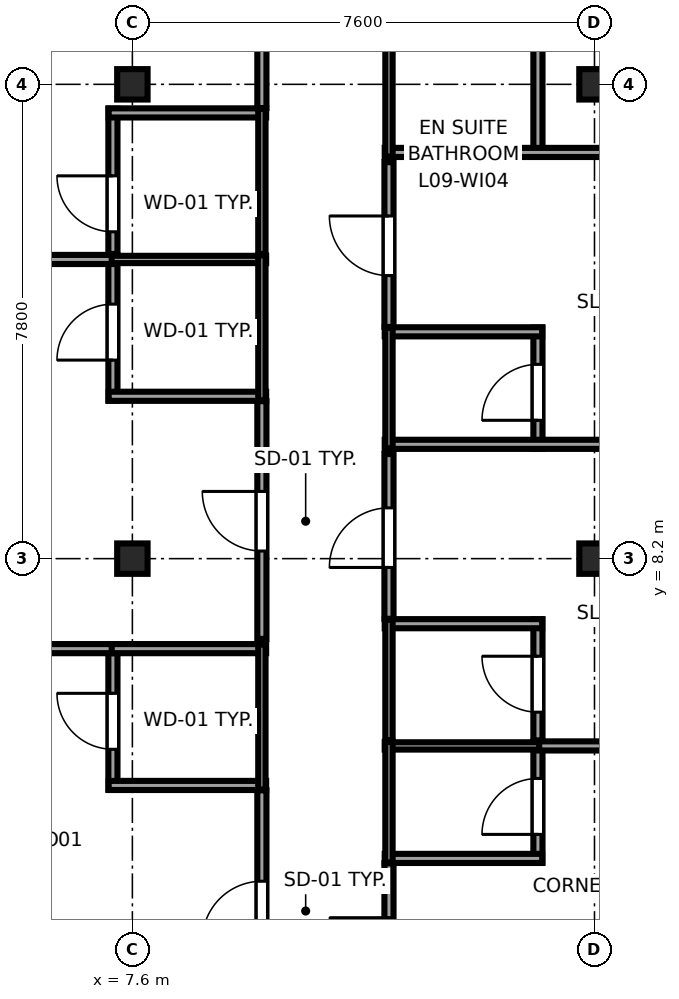
"""IFC4 building model, lengths in metres.
Left out: names, types, materials, properties, quantities, classifications, styles, units other than length and angle.
Written with IfcOpenShell. Run it as: python <this file> out.ifc"""

import sys

from ifc_helpers import new_model, si_unit, direction, frame, frame_2d, origin, origin_2d, place, context, subcontext, project, spatial, rectangle, i_section, extrude, source, transform, mapped, element, fill, save


model = new_model("IFC4")
c1 = context("Model", 3, precision=1e-05, world=origin(), true_north=direction((0.0, 1.0)))
c2 = subcontext(c1, "Body", "Model", "MODEL_VIEW")
j1 = project(units=[si_unit("LENGTHUNIT", "METRE"), si_unit("PLANEANGLEUNIT", "RADIAN")], contexts=[c1])
p1 = place(None, origin())
s1 = spatial("IfcSite", under=j1, at=p1, CompositionType="ELEMENT")
p2 = place(p1, origin())
s2 = spatial("IfcBuilding", under=s1, at=p2, CompositionType="ELEMENT")
p3 = place(p2, frame((0.0, 0.0, 42.65)))
s3 = spatial("IfcBuildingStorey", under=s2, at=p3, CompositionType="ELEMENT", Elevation=42.65)
m1 = source(origin(), c2, "Body", "SweptSolid", [
    extrude(i_section(OverallWidth=0.5, OverallDepth=0.5, WebThickness=0.028, FlangeThickness=0.045, at=origin_2d()), origin(), (0.0, 0.0, 1.0), 3.55),
])
for number, where, z_axis, x_axis in (
    (1, (7.6, 8.2, 0.0), (0.0, 0.0, 1.0), (1.0, 0.0, 0.0)),
    (2, (7.6, 16.0, 0.0), (0.0, 0.0, 1.0), (1.0, 0.0, 0.0)),
    (3, (15.2, 8.2, 0.0), (0.0, 0.0, 1.0), (1.0, 0.0, 0.0)),
    (4, (15.2, 16.0, 0.0), (0.0, 0.0, 1.0), (1.0, 0.0, 0.0)),
):
    element("IfcColumn", number, at=place(p3, frame(where, z_axis=z_axis, x_axis=x_axis)), inside=s3, PredefinedType="COLUMN", context=c2, shape_type="MappedRepresentation", body=[
        mapped(m1, transform((0.0, 0.0, 0.0), x_axis=(1.0, 0.0, 0.0), y_axis=(0.0, 1.0, 0.0), z_axis=(0.0, 0.0, 1.0), scale=1.0)),
    ])
p4 = place(p3, frame((7.28, 4.4, 0.0), z_axis=(0.0, 0.0, 1.0), x_axis=(0.0, 1.0, 0.0)))
e5 = element("IfcWall", 5, at=p4, inside=s3, PredefinedType="PARTITIONING", context=c2, shape_type="SweptSolid", body=[
    extrude(rectangle(XDim=2.39, YDim=0.15, at=frame_2d((1.195, 0.0))), origin(), (0.0, 0.0, 1.0), 3.37),
])
p5 = place(p4, frame((0.665, 0.0, 0.0)))
e6 = element("IfcOpeningElement", 6, at=p5, cuts=e5, PredefinedType="OPENING", context=c2, shape_type="SweptSolid", body=[
    extrude(rectangle(XDim=0.92, YDim=2.01, at=frame_2d((0.46, 1.005))), frame((0.0, 0.085, 0.0), z_axis=(0.0, -1.0, 0.0), x_axis=(1.0, 0.0, 0.0)), (0.0, 0.0, 1.0), 0.17),
])
for number, where, z_axis, x_axis in (
    (7, (7.21, 4.47, 0.0), (0.0, 0.0, 1.0), (1.0, 0.0, 0.0)),
    (8, (7.21, 6.72, 0.0), (0.0, 0.0, 1.0), (1.0, 0.0, 0.0)),
):
    element("IfcWall", number, at=place(p3, frame(where, z_axis=z_axis, x_axis=x_axis)), inside=s3, PredefinedType="PARTITIONING", context=c2, shape_type="SweptSolid", body=[
        extrude(rectangle(XDim=2.59, YDim=0.15, at=frame_2d((1.295, 0.0))), origin(), (0.0, 0.0, 1.0), 3.37),
    ])
p6 = place(p3, frame((9.73, 4.4, 0.0), z_axis=(0.0, 0.0, 1.0), x_axis=(0.0, 1.0, 0.0)))
e9 = element("IfcWall", 9, at=p6, inside=s3, PredefinedType="PLUMBINGWALL", context=c2, shape_type="SweptSolid", body=[
    extrude(rectangle(XDim=2.39, YDim=0.12, at=frame_2d((1.195, 0.0))), origin(), (0.0, 0.0, 1.0), 3.37),
])
p7 = place(p3, frame((7.28, 10.8, 0.0), z_axis=(0.0, 0.0, 1.0), x_axis=(0.0, 1.0, 0.0)))
e10 = element("IfcWall", 10, at=p7, inside=s3, PredefinedType="PARTITIONING", context=c2, shape_type="SweptSolid", body=[
    extrude(rectangle(XDim=2.39, YDim=0.15, at=frame_2d((1.195, 0.0))), origin(), (0.0, 0.0, 1.0), 3.37),
])
p8 = place(p7, frame((0.665, 0.0, 0.0)))
e11 = element("IfcOpeningElement", 11, at=p8, cuts=e10, PredefinedType="OPENING", context=c2, shape_type="SweptSolid", body=[
    extrude(rectangle(XDim=0.92, YDim=2.01, at=frame_2d((0.46, 1.005))), frame((0.0, 0.085, 0.0), z_axis=(0.0, -1.0, 0.0), x_axis=(1.0, 0.0, 0.0)), (0.0, 0.0, 1.0), 0.17),
])
p9 = place(p3, frame((7.21, 10.87, 0.0), z_axis=(0.0, 0.0, 1.0), x_axis=(1.0, 0.0, 0.0)))
e12 = element("IfcWall", 12, at=p9, inside=s3, PredefinedType="PARTITIONING", context=c2, shape_type="SweptSolid", body=[
    extrude(rectangle(XDim=2.59, YDim=0.15, at=frame_2d((1.295, 0.0))), origin(), (0.0, 0.0, 1.0), 3.37),
])
p10 = place(p3, frame((7.21, 13.12, 0.0), z_axis=(0.0, 0.0, 1.0), x_axis=(1.0, 0.0, 0.0)))
e13 = element("IfcWall", 13, at=p10, inside=s3, PredefinedType="PLUMBINGWALL", context=c2, shape_type="SweptSolid", body=[
    extrude(rectangle(XDim=2.59, YDim=0.12, at=frame_2d((1.295, 0.0))), origin(), (0.0, 0.0, 1.0), 3.37),
])
p11 = place(p3, frame((9.73, 10.8, 0.0), z_axis=(0.0, 0.0, 1.0), x_axis=(0.0, 1.0, 0.0)))
e14 = element("IfcWall", 14, at=p11, inside=s3, PredefinedType="PLUMBINGWALL", context=c2, shape_type="SweptSolid", body=[
    extrude(rectangle(XDim=2.39, YDim=0.12, at=frame_2d((1.195, 0.0))), origin(), (0.0, 0.0, 1.0), 3.37),
])
p12 = place(p3, frame((7.28, 13.21, 0.0), z_axis=(0.0, 0.0, 1.0), x_axis=(0.0, 1.0, 0.0)))
e15 = element("IfcWall", 15, at=p12, inside=s3, PredefinedType="PARTITIONING", context=c2, shape_type="SweptSolid", body=[
    extrude(rectangle(XDim=2.39, YDim=0.15, at=frame_2d((1.195, 0.0))), origin(), (0.0, 0.0, 1.0), 3.37),
])
p13 = place(p12, frame((0.365, 0.0, 0.0)))
e16 = element("IfcOpeningElement", 16, at=p13, cuts=e15, PredefinedType="OPENING", context=c2, shape_type="SweptSolid", body=[
    extrude(rectangle(XDim=0.92, YDim=2.01, at=frame_2d((0.46, 1.005))), frame((0.0, 0.085, 0.0), z_axis=(0.0, -1.0, 0.0), x_axis=(1.0, 0.0, 0.0)), (0.0, 0.0, 1.0), 0.17),
])
p14 = place(p3, frame((7.21, 15.53, 0.0), z_axis=(0.0, 0.0, 1.0), x_axis=(1.0, 0.0, 0.0)))
e17 = element("IfcWall", 17, at=p14, inside=s3, PredefinedType="PARTITIONING", context=c2, shape_type="SweptSolid", body=[
    extrude(rectangle(XDim=2.59, YDim=0.15, at=frame_2d((1.295, 0.0))), origin(), (0.0, 0.0, 1.0), 3.37),
])
p15 = place(p3, frame((9.73, 13.21, 0.0), z_axis=(0.0, 0.0, 1.0), x_axis=(0.0, 1.0, 0.0)))
e18 = element("IfcWall", 18, at=p15, inside=s3, PredefinedType="PLUMBINGWALL", context=c2, shape_type="SweptSolid", body=[
    extrude(rectangle(XDim=2.39, YDim=0.12, at=frame_2d((1.195, 0.0))), origin(), (0.0, 0.0, 1.0), 3.37),
])
p16 = place(p3, frame((14.27, 3.2, 0.0), z_axis=(0.0, 0.0, 1.0), x_axis=(0.0, 1.0, 0.0)))
e19 = element("IfcWall", 19, at=p16, inside=s3, PredefinedType="PARTITIONING", context=c2, shape_type="SweptSolid", body=[
    extrude(rectangle(XDim=1.99, YDim=0.15, at=frame_2d((0.995, 0.0))), origin(), (0.0, 0.0, 1.0), 3.37),
])
p17 = place(p16, frame((0.465, 0.0, 0.0)))
e20 = element("IfcOpeningElement", 20, at=p17, cuts=e19, PredefinedType="OPENING", context=c2, shape_type="SweptSolid", body=[
    extrude(rectangle(XDim=0.92, YDim=2.01, at=frame_2d((0.46, 1.005))), frame((0.0, 0.085, 0.0), z_axis=(0.0, -1.0, 0.0), x_axis=(1.0, 0.0, 0.0)), (0.0, 0.0, 1.0), 0.17),
])
p18 = place(p3, frame((11.75, 3.27, 0.0), z_axis=(0.0, 0.0, 1.0), x_axis=(1.0, 0.0, 0.0)))
e21 = element("IfcWall", 21, at=p18, inside=s3, PredefinedType="PARTITIONING", context=c2, shape_type="SweptSolid", body=[
    extrude(rectangle(XDim=2.59, YDim=0.15, at=frame_2d((1.295, 0.0))), origin(), (0.0, 0.0, 1.0), 3.37),
])
p19 = place(p3, frame((11.75, 5.12, 0.0), z_axis=(0.0, 0.0, 1.0), x_axis=(1.0, 0.0, 0.0)))
e22 = element("IfcWall", 22, at=p19, inside=s3, PredefinedType="PLUMBINGWALL", context=c2, shape_type="SweptSolid", body=[
    extrude(rectangle(XDim=2.59, YDim=0.12, at=frame_2d((1.295, 0.0))), origin(), (0.0, 0.0, 1.0), 3.37),
])
p20 = place(p3, frame((11.82, 3.2, 0.0), z_axis=(0.0, 0.0, 1.0), x_axis=(0.0, 1.0, 0.0)))
e23 = element("IfcWall", 23, at=p20, inside=s3, PredefinedType="PLUMBINGWALL", context=c2, shape_type="SweptSolid", body=[
    extrude(rectangle(XDim=1.99, YDim=0.12, at=frame_2d((0.995, 0.0))), origin(), (0.0, 0.0, 1.0), 3.37),
])
p21 = place(p3, frame((14.27, 5.21, 0.0), z_axis=(0.0, 0.0, 1.0), x_axis=(0.0, 1.0, 0.0)))
e24 = element("IfcWall", 24, at=p21, inside=s3, PredefinedType="PARTITIONING", context=c2, shape_type="SweptSolid", body=[
    extrude(rectangle(XDim=1.99, YDim=0.15, at=frame_2d((0.995, 0.0))), origin(), (0.0, 0.0, 1.0), 3.37),
])
p22 = place(p21, frame((0.465, 0.0, 0.0)))
e25 = element("IfcOpeningElement", 25, at=p22, cuts=e24, PredefinedType="OPENING", context=c2, shape_type="SweptSolid", body=[
    extrude(rectangle(XDim=0.92, YDim=2.01, at=frame_2d((0.46, 1.005))), frame((0.0, 0.085, 0.0), z_axis=(0.0, -1.0, 0.0), x_axis=(1.0, 0.0, 0.0)), (0.0, 0.0, 1.0), 0.17),
])
p23 = place(p3, frame((11.75, 7.13, 0.0), z_axis=(0.0, 0.0, 1.0), x_axis=(1.0, 0.0, 0.0)))
e26 = element("IfcWall", 26, at=p23, inside=s3, PredefinedType="PARTITIONING", context=c2, shape_type="SweptSolid", body=[
    extrude(rectangle(XDim=2.59, YDim=0.15, at=frame_2d((1.295, 0.0))), origin(), (0.0, 0.0, 1.0), 3.37),
])
p24 = place(p3, frame((11.82, 5.21, 0.0), z_axis=(0.0, 0.0, 1.0), x_axis=(0.0, 1.0, 0.0)))
e27 = element("IfcWall", 27, at=p24, inside=s3, PredefinedType="PLUMBINGWALL", context=c2, shape_type="SweptSolid", body=[
    extrude(rectangle(XDim=1.99, YDim=0.12, at=frame_2d((0.995, 0.0))), origin(), (0.0, 0.0, 1.0), 3.37),
])
p25 = place(p3, frame((14.27, 10.01, 0.0), z_axis=(0.0, 0.0, 1.0), x_axis=(0.0, 1.0, 0.0)))
e28 = element("IfcWall", 28, at=p25, inside=s3, PredefinedType="PARTITIONING", context=c2, shape_type="SweptSolid", body=[
    extrude(rectangle(XDim=1.99, YDim=0.15, at=frame_2d((0.995, 0.0))), origin(), (0.0, 0.0, 1.0), 3.37),
])
p26 = place(p25, frame((0.465, 0.0, 0.0)))
e29 = element("IfcOpeningElement", 29, at=p26, cuts=e28, PredefinedType="OPENING", context=c2, shape_type="SweptSolid", body=[
    extrude(rectangle(XDim=0.92, YDim=2.01, at=frame_2d((0.46, 1.005))), frame((0.0, 0.085, 0.0), z_axis=(0.0, -1.0, 0.0), x_axis=(1.0, 0.0, 0.0)), (0.0, 0.0, 1.0), 0.17),
])
p27 = place(p3, frame((11.75, 10.08, 0.0), z_axis=(0.0, 0.0, 1.0), x_axis=(1.0, 0.0, 0.0)))
e30 = element("IfcWall", 30, at=p27, inside=s3, PredefinedType="PARTITIONING", context=c2, shape_type="SweptSolid", body=[
    extrude(rectangle(XDim=10.6, YDim=0.15, at=frame_2d((5.3, 0.0))), origin(), (0.0, 0.0, 1.0), 3.37),
])
p28 = place(p3, frame((11.75, 11.93, 0.0), z_axis=(0.0, 0.0, 1.0), x_axis=(1.0, 0.0, 0.0)))
e31 = element("IfcWall", 31, at=p28, inside=s3, PredefinedType="PARTITIONING", context=c2, shape_type="SweptSolid", body=[
    extrude(rectangle(XDim=2.59, YDim=0.15, at=frame_2d((1.295, 0.0))), origin(), (0.0, 0.0, 1.0), 3.37),
])
p29 = place(p3, frame((11.82, 10.01, 0.0), z_axis=(0.0, 0.0, 1.0), x_axis=(0.0, 1.0, 0.0)))
e32 = element("IfcWall", 32, at=p29, inside=s3, PredefinedType="PLUMBINGWALL", context=c2, shape_type="SweptSolid", body=[
    extrude(rectangle(XDim=1.99, YDim=0.12, at=frame_2d((0.995, 0.0))), origin(), (0.0, 0.0, 1.0), 3.37),
])
p30 = place(p3, frame((14.27, 14.81, 0.0), z_axis=(0.0, 0.0, 1.0), x_axis=(0.0, 1.0, 0.0)))
e33 = element("IfcWall", 33, at=p30, inside=s3, PredefinedType="PARTITIONING", context=c2, shape_type="SweptSolid", body=[
    extrude(rectangle(XDim=1.99, YDim=0.15, at=frame_2d((0.995, 0.0))), origin(), (0.0, 0.0, 1.0), 3.37),
])
p31 = place(p3, frame((11.75, 14.88, 0.0), z_axis=(0.0, 0.0, 1.0), x_axis=(1.0, 0.0, 0.0)))
e34 = element("IfcWall", 34, at=p31, inside=s3, PredefinedType="PARTITIONING", context=c2, shape_type="SweptSolid", body=[
    extrude(rectangle(XDim=10.6, YDim=0.15, at=frame_2d((5.3, 0.0))), origin(), (0.0, 0.0, 1.0), 3.37),
])
p32 = place(p3, frame((11.82, 14.81, 0.0), z_axis=(0.0, 0.0, 1.0), x_axis=(0.0, 1.0, 0.0)))
e35 = element("IfcWall", 35, at=p32, inside=s3, PredefinedType="PLUMBINGWALL", context=c2, shape_type="SweptSolid", body=[
    extrude(rectangle(XDim=1.99, YDim=0.12, at=frame_2d((0.995, 0.0))), origin(), (0.0, 0.0, 1.0), 3.37),
])
p33 = place(p3, frame((9.73, 0.405, 0.0), z_axis=(0.0, 0.0, 1.0), x_axis=(0.0, 1.0, 0.0)))
e36 = element("IfcWall", 36, at=p33, inside=s3, PredefinedType="PARTITIONING", context=c2, shape_type="SweptSolid", body=[
    extrude(rectangle(XDim=3.985, YDim=0.15, at=frame_2d((1.992, 0.0))), origin(), (0.0, 0.0, 1.0), 3.37),
])
p34 = place(p33, frame((1.51, 0.0, 0.0)))
e37 = element("IfcOpeningElement", 37, at=p34, cuts=e36, PredefinedType="OPENING", context=c2, shape_type="SweptSolid", body=[
    extrude(rectangle(XDim=0.98, YDim=2.12, at=frame_2d((0.49, 1.06))), frame((0.0, 0.085, 0.0), z_axis=(0.0, -1.0, 0.0), x_axis=(1.0, 0.0, 0.0)), (0.0, 0.0, 1.0), 0.17),
])
p35 = place(p3, frame((0.405, 6.72, 0.0), z_axis=(0.0, 0.0, 1.0), x_axis=(1.0, 0.0, 0.0)))
e38 = element("IfcWall", 38, at=p35, inside=s3, PredefinedType="PARTITIONING", context=c2, shape_type="SweptSolid", body=[
    extrude(rectangle(XDim=6.855, YDim=0.15, at=frame_2d((3.427, 0.0))), origin(), (0.0, 0.0, 1.0), 3.37),
])
p36 = place(p3, frame((9.73, 6.88, 0.0), z_axis=(0.0, 0.0, 1.0), x_axis=(0.0, 1.0, 0.0)))
e39 = element("IfcWall", 39, at=p36, inside=s3, PredefinedType="PARTITIONING", context=c2, shape_type="SweptSolid", body=[
    extrude(rectangle(XDim=3.91, YDim=0.15, at=frame_2d((1.955, 0.0))), origin(), (0.0, 0.0, 1.0), 3.37),
])
p37 = place(p36, frame((1.445, 0.0, 0.0)))
e40 = element("IfcOpeningElement", 40, at=p37, cuts=e39, PredefinedType="OPENING", context=c2, shape_type="SweptSolid", body=[
    extrude(rectangle(XDim=0.98, YDim=2.12, at=frame_2d((0.49, 1.06))), frame((0.0, 0.085, 0.0), z_axis=(0.0, -1.0, 0.0), x_axis=(1.0, 0.0, 0.0)), (0.0, 0.0, 1.0), 0.17),
])
p38 = place(p3, frame((0.405, 13.12, 0.0), z_axis=(0.0, 0.0, 1.0), x_axis=(1.0, 0.0, 0.0)))
e41 = element("IfcWall", 41, at=p38, inside=s3, PredefinedType="PARTITIONING", context=c2, shape_type="SweptSolid", body=[
    extrude(rectangle(XDim=6.855, YDim=0.15, at=frame_2d((3.427, 0.0))), origin(), (0.0, 0.0, 1.0), 3.37),
])
p39 = place(p3, frame((9.73, 15.61, 0.0), z_axis=(0.0, 0.0, 1.0), x_axis=(0.0, 1.0, 0.0)))
e42 = element("IfcWall", 42, at=p39, inside=s3, PredefinedType="PARTITIONING", context=c2, shape_type="SweptSolid", body=[
    extrude(rectangle(XDim=3.81, YDim=0.15, at=frame_2d((1.905, 0.0))), origin(), (0.0, 0.0, 1.0), 3.37),
])
p40 = place(p39, frame((1.395, 0.0, 0.0)))
e43 = element("IfcOpeningElement", 43, at=p40, cuts=e42, PredefinedType="OPENING", context=c2, shape_type="SweptSolid", body=[
    extrude(rectangle(XDim=0.98, YDim=2.12, at=frame_2d((0.49, 1.06))), frame((0.0, 0.085, 0.0), z_axis=(0.0, -1.0, 0.0), x_axis=(1.0, 0.0, 0.0)), (0.0, 0.0, 1.0), 0.17),
])
p41 = place(p3, frame((11.82, 0.405, 0.0), z_axis=(0.0, 0.0, 1.0), x_axis=(0.0, 1.0, 0.0)))
e44 = element("IfcWall", 44, at=p41, inside=s3, PredefinedType="PARTITIONING", context=c2, shape_type="SweptSolid", body=[
    extrude(rectangle(XDim=2.785, YDim=0.15, at=frame_2d((1.393, 0.0))), origin(), (0.0, 0.0, 1.0), 3.37),
])
p42 = place(p41, frame((0.91, 0.0, 0.0)))
e45 = element("IfcOpeningElement", 45, at=p42, cuts=e44, PredefinedType="OPENING", context=c2, shape_type="SweptSolid", body=[
    extrude(rectangle(XDim=0.98, YDim=2.12, at=frame_2d((0.49, 1.06))), frame((0.0, 0.085, 0.0), z_axis=(0.0, -1.0, 0.0), x_axis=(1.0, 0.0, 0.0)), (0.0, 0.0, 1.0), 0.17),
])
p43 = place(p3, frame((14.29, 5.12, 0.0), z_axis=(0.0, 0.0, 1.0), x_axis=(1.0, 0.0, 0.0)))
e46 = element("IfcWall", 46, at=p43, inside=s3, PredefinedType="PARTITIONING", context=c2, shape_type="SweptSolid", body=[
    extrude(rectangle(XDim=8.06, YDim=0.15, at=frame_2d((4.03, 0.0))), origin(), (0.0, 0.0, 1.0), 3.37),
])
p44 = place(p3, frame((11.82, 7.21, 0.0), z_axis=(0.0, 0.0, 1.0), x_axis=(0.0, 1.0, 0.0)))
e47 = element("IfcWall", 47, at=p44, inside=s3, PredefinedType="PARTITIONING", context=c2, shape_type="SweptSolid", body=[
    extrude(rectangle(XDim=2.71, YDim=0.15, at=frame_2d((1.355, 0.0))), origin(), (0.0, 0.0, 1.0), 3.37),
])
p45 = place(p44, frame((0.845, 0.0, 0.0)))
e48 = element("IfcOpeningElement", 48, at=p45, cuts=e47, PredefinedType="OPENING", context=c2, shape_type="SweptSolid", body=[
    extrude(rectangle(XDim=0.98, YDim=2.12, at=frame_2d((0.49, 1.06))), frame((0.0, 0.085, 0.0), z_axis=(0.0, -1.0, 0.0), x_axis=(1.0, 0.0, 0.0)), (0.0, 0.0, 1.0), 0.17),
])
p46 = place(p3, frame((11.82, 12.01, 0.0), z_axis=(0.0, 0.0, 1.0), x_axis=(0.0, 1.0, 0.0)))
e49 = element("IfcWall", 49, at=p46, inside=s3, PredefinedType="PARTITIONING", context=c2, shape_type="SweptSolid", body=[
    extrude(rectangle(XDim=2.71, YDim=0.15, at=frame_2d((1.355, 0.0))), origin(), (0.0, 0.0, 1.0), 3.37),
])
p47 = place(p46, frame((0.845, 0.0, 0.0)))
e50 = element("IfcOpeningElement", 50, at=p47, cuts=e49, PredefinedType="OPENING", context=c2, shape_type="SweptSolid", body=[
    extrude(rectangle(XDim=0.98, YDim=2.12, at=frame_2d((0.49, 1.06))), frame((0.0, 0.085, 0.0), z_axis=(0.0, -1.0, 0.0), x_axis=(1.0, 0.0, 0.0)), (0.0, 0.0, 1.0), 0.17),
])
m2 = source(origin(), c2, "Body", "SweptSolid", [
    extrude(rectangle(XDim=0.92, YDim=2.01, at=frame_2d((0.46, 1.005))), frame((0.0, 0.025, 0.0), z_axis=(0.0, -1.0, 0.0), x_axis=(1.0, 0.0, 0.0)), (0.0, 0.0, 1.0), 0.05),
])
p48 = place(p5, origin())
e51 = element("IfcDoor", 51, at=p48, inside=s3, OperationType="SINGLE_SWING_RIGHT", PredefinedType="DOOR", context=c2, shape_type="MappedRepresentation", body=[
    mapped(m2, transform((0.0, 0.0, 0.0), x_axis=(1.0, 0.0, 0.0), y_axis=(0.0, 1.0, 0.0), z_axis=(0.0, 0.0, 1.0), scale=1.0)),
])
fill(e6, e51)
p49 = place(p8, origin())
e52 = element("IfcDoor", 52, at=p49, inside=s3, OperationType="SINGLE_SWING_LEFT", PredefinedType="DOOR", context=c2, shape_type="MappedRepresentation", body=[
    mapped(m2, transform((0.0, 0.0, 0.0), x_axis=(1.0, 0.0, 0.0), y_axis=(0.0, 1.0, 0.0), z_axis=(0.0, 0.0, 1.0), scale=1.0)),
])
fill(e11, e52)
p50 = place(p13, origin())
e53 = element("IfcDoor", 53, at=p50, inside=s3, OperationType="SINGLE_SWING_RIGHT", PredefinedType="DOOR", context=c2, shape_type="MappedRepresentation", body=[
    mapped(m2, transform((0.0, 0.0, 0.0), x_axis=(1.0, 0.0, 0.0), y_axis=(0.0, 1.0, 0.0), z_axis=(0.0, 0.0, 1.0), scale=1.0)),
])
fill(e16, e53)
p51 = place(p17, origin())
e54 = element("IfcDoor", 54, at=p51, inside=s3, OperationType="SINGLE_SWING_LEFT", PredefinedType="DOOR", context=c2, shape_type="MappedRepresentation", body=[
    mapped(m2, transform((0.0, 0.0, 0.0), x_axis=(1.0, 0.0, 0.0), y_axis=(0.0, 1.0, 0.0), z_axis=(0.0, 0.0, 1.0), scale=1.0)),
])
fill(e20, e54)
p52 = place(p22, origin())
e55 = element("IfcDoor", 55, at=p52, inside=s3, OperationType="SINGLE_SWING_RIGHT", PredefinedType="DOOR", context=c2, shape_type="MappedRepresentation", body=[
    mapped(m2, transform((0.0, 0.0, 0.0), x_axis=(1.0, 0.0, 0.0), y_axis=(0.0, 1.0, 0.0), z_axis=(0.0, 0.0, 1.0), scale=1.0)),
])
fill(e25, e55)
p53 = place(p26, origin())
e56 = element("IfcDoor", 56, at=p53, inside=s3, OperationType="SINGLE_SWING_LEFT", PredefinedType="DOOR", context=c2, shape_type="MappedRepresentation", body=[
    mapped(m2, transform((0.0, 0.0, 0.0), x_axis=(1.0, 0.0, 0.0), y_axis=(0.0, 1.0, 0.0), z_axis=(0.0, 0.0, 1.0), scale=1.0)),
])
fill(e29, e56)
m3 = source(origin(), c2, "Body", "SweptSolid", [
    extrude(rectangle(XDim=0.98, YDim=2.12, at=frame_2d((0.49, 1.06))), frame((0.0, 0.025, 0.0), z_axis=(0.0, -1.0, 0.0), x_axis=(1.0, 0.0, 0.0)), (0.0, 0.0, 1.0), 0.05),
])
p54 = place(p34, origin())
e57 = element("IfcDoor", 57, at=p54, inside=s3, OperationType="SINGLE_SWING_LEFT", PredefinedType="DOOR", context=c2, shape_type="MappedRepresentation", body=[
    mapped(m3, transform((0.0, 0.0, 0.0), x_axis=(1.0, 0.0, 0.0), y_axis=(0.0, 1.0, 0.0), z_axis=(0.0, 0.0, 1.0), scale=1.0)),
])
fill(e37, e57)
p55 = place(p37, origin())
e58 = element("IfcDoor", 58, at=p55, inside=s3, OperationType="SINGLE_SWING_RIGHT", PredefinedType="DOOR", context=c2, shape_type="MappedRepresentation", body=[
    mapped(m3, transform((0.0, 0.0, 0.0), x_axis=(1.0, 0.0, 0.0), y_axis=(0.0, 1.0, 0.0), z_axis=(0.0, 0.0, 1.0), scale=1.0)),
])
fill(e40, e58)
p56 = place(p42, origin())
e59 = element("IfcDoor", 59, at=p56, inside=s3, OperationType="SINGLE_SWING_RIGHT", PredefinedType="DOOR", context=c2, shape_type="MappedRepresentation", body=[
    mapped(m3, transform((0.0, 0.0, 0.0), x_axis=(1.0, 0.0, 0.0), y_axis=(0.0, 1.0, 0.0), z_axis=(0.0, 0.0, 1.0), scale=1.0)),
])
fill(e45, e59)
p57 = place(p45, origin())
e60 = element("IfcDoor", 60, at=p57, inside=s3, OperationType="SINGLE_SWING_LEFT", PredefinedType="DOOR", context=c2, shape_type="MappedRepresentation", body=[
    mapped(m3, transform((0.0, 0.0, 0.0), x_axis=(1.0, 0.0, 0.0), y_axis=(0.0, 1.0, 0.0), z_axis=(0.0, 0.0, 1.0), scale=1.0)),
])
fill(e48, e60)
p58 = place(p47, origin())
e61 = element("IfcDoor", 61, at=p58, inside=s3, OperationType="SINGLE_SWING_RIGHT", PredefinedType="DOOR", context=c2, shape_type="MappedRepresentation", body=[
    mapped(m3, transform((0.0, 0.0, 0.0), x_axis=(1.0, 0.0, 0.0), y_axis=(0.0, 1.0, 0.0), z_axis=(0.0, 0.0, 1.0), scale=1.0)),
])
fill(e50, e61)
save(model, sys.argv[1])
